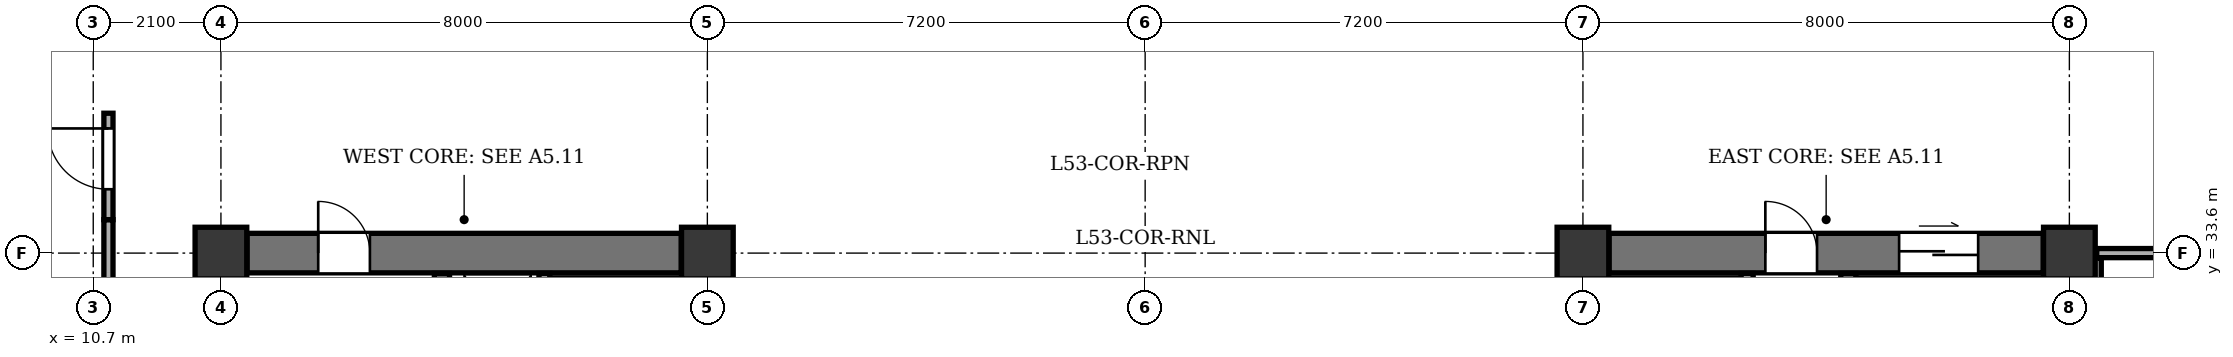
"""IFC4 building model, lengths in metres.
Left out: names, types, materials, properties, quantities, classifications, styles, units other than length and angle.
Written with IfcOpenShell. Run it as: python <this file> out.ifc"""

import sys

from ifc_helpers import new_model, si_unit, direction, frame, frame_2d, origin, origin_2d, place, context, subcontext, project, spatial, rectangle, extrude, element, fill, save


model = new_model("IFC4")
c1 = context("Model", 3, precision=1e-05, world=origin(), true_north=direction((0.0, 1.0)))
c2 = subcontext(c1, "Body", "Model", "MODEL_VIEW")
j1 = project(units=[si_unit("LENGTHUNIT", "METRE"), si_unit("PLANEANGLEUNIT", "RADIAN")], contexts=[c1])
p1 = place(None, origin())
s1 = spatial("IfcSite", under=j1, at=p1, CompositionType="ELEMENT")
p2 = place(p1, origin())
s2 = spatial("IfcBuilding", under=s1, at=p2, CompositionType="ELEMENT")
p3 = place(p2, frame((0.0, 0.0, 207.5)))
s3 = spatial("IfcBuildingStorey", under=s2, at=p3, CompositionType="ELEMENT", Elevation=207.5)
for number, where, z_axis, x_axis in (
    (1, (12.8, 33.6, 0.0), (0.0, 0.0, 1.0), (1.0, 0.0, 0.0)),
    (2, (20.8, 33.6, 0.0), (0.0, 0.0, 1.0), (1.0, 0.0, 0.0)),
    (3, (35.2, 33.6, 0.0), (0.0, 0.0, 1.0), (1.0, 0.0, 0.0)),
    (4, (43.2, 33.6, 0.0), (0.0, 0.0, 1.0), (1.0, 0.0, 0.0)),
):
    element("IfcColumn", number, at=place(p3, frame(where, z_axis=z_axis, x_axis=x_axis)), inside=s3, PredefinedType="COLUMN", context=c2, shape_type="SweptSolid", body=[
        extrude(rectangle(XDim=0.85, YDim=0.85, at=origin_2d()), origin(), (0.0, 0.0, 1.0), 3.4),
    ])
p4 = place(p3, frame((13.23, 33.6, 0.0), z_axis=(0.0, 0.0, 1.0), x_axis=(1.0, 0.0, 0.0)))
e5 = element("IfcWall", 5, at=p4, inside=s3, PredefinedType="SHEAR", context=c2, shape_type="SweptSolid", body=[
    extrude(rectangle(XDim=7.14, YDim=0.65, at=frame_2d((3.57, 0.0))), origin(), (0.0, 0.0, 1.0), 3.1),
])
p5 = place(p4, frame((1.17, 0.0, 0.0)))
e6 = element("IfcOpeningElement", 6, at=p5, cuts=e5, PredefinedType="OPENING", context=c2, shape_type="SweptSolid", body=[
    extrude(rectangle(XDim=0.85, YDim=2.02, at=frame_2d((0.425, 1.01))), frame((0.0, 0.335, 0.0), z_axis=(0.0, -1.0, 0.0), x_axis=(1.0, 0.0, 0.0)), (0.0, 0.0, 1.0), 0.67),
])
p6 = place(p3, frame((16.435, 21.135, 0.0), z_axis=(0.0, 0.0, 1.0), x_axis=(0.0, 1.0, 0.0)))
e7 = element("IfcWall", 7, at=p6, inside=s3, PredefinedType="SHEAR", context=c2, shape_type="SweptSolid", body=[
    extrude(rectangle(XDim=12.13, YDim=0.25, at=frame_2d((6.065, 0.0))), origin(), (0.0, 0.0, 1.0), 3.1),
])
p7 = place(p6, frame((0.515, 0.0, 0.0)))
e8 = element("IfcOpeningElement", 8, at=p7, cuts=e7, PredefinedType="OPENING", context=c2, shape_type="SweptSolid", body=[
    extrude(rectangle(XDim=1.2, YDim=2.15, at=frame_2d((0.6, 1.075))), frame((0.0, 0.135, 0.0), z_axis=(0.0, -1.0, 0.0), x_axis=(1.0, 0.0, 0.0)), (0.0, 0.0, 1.0), 0.27),
])
p8 = place(p6, frame((2.665, 0.0, 0.0)))
e9 = element("IfcOpeningElement", 9, at=p8, cuts=e7, PredefinedType="OPENING", context=c2, shape_type="SweptSolid", body=[
    extrude(rectangle(XDim=1.15, YDim=2.15, at=frame_2d((0.575, 1.075))), frame((0.0, 0.135, 0.0), z_axis=(0.0, -1.0, 0.0), x_axis=(1.0, 0.0, 0.0)), (0.0, 0.0, 1.0), 0.27),
])
p9 = place(p3, frame((18.12, 31.17, 0.0), z_axis=(0.0, 0.0, 1.0), x_axis=(0.0, 1.0, 0.0)))
e10 = element("IfcWall", 10, at=p9, inside=s3, PredefinedType="PARTITIONING", context=c2, shape_type="SweptSolid", body=[
    extrude(rectangle(XDim=2.095, YDim=0.18, at=frame_2d((1.047, 0.0))), origin(), (0.0, 0.0, 1.0), 3.1),
])
p10 = place(p3, frame((35.63, 33.6, 0.0), z_axis=(0.0, 0.0, 1.0), x_axis=(1.0, 0.0, 0.0)))
e11 = element("IfcWall", 11, at=p10, inside=s3, PredefinedType="SHEAR", context=c2, shape_type="SweptSolid", body=[
    extrude(rectangle(XDim=7.14, YDim=0.65, at=frame_2d((3.57, 0.0))), origin(), (0.0, 0.0, 1.0), 3.1),
])
p11 = place(p10, frame((4.77, 0.0, 0.0)))
e12 = element("IfcOpeningElement", 12, at=p11, cuts=e11, PredefinedType="OPENING", context=c2, shape_type="SweptSolid", body=[
    extrude(rectangle(XDim=1.3, YDim=2.15, at=frame_2d((0.65, 1.075))), frame((0.0, 0.335, 0.0), z_axis=(0.0, -1.0, 0.0), x_axis=(1.0, 0.0, 0.0)), (0.0, 0.0, 1.0), 0.67),
])
p12 = place(p10, frame((2.57, 0.0, 0.0)))
e13 = element("IfcOpeningElement", 13, at=p12, cuts=e11, PredefinedType="OPENING", context=c2, shape_type="SweptSolid", body=[
    extrude(rectangle(XDim=0.85, YDim=2.02, at=frame_2d((0.425, 1.01))), frame((0.0, 0.335, 0.0), z_axis=(0.0, -1.0, 0.0), x_axis=(1.0, 0.0, 0.0)), (0.0, 0.0, 1.0), 0.67),
])
p13 = place(p3, frame((39.565, 21.135, 0.0), z_axis=(0.0, 0.0, 1.0), x_axis=(0.0, 1.0, 0.0)))
e14 = element("IfcWall", 14, at=p13, inside=s3, PredefinedType="SHEAR", context=c2, shape_type="SweptSolid", body=[
    extrude(rectangle(XDim=12.13, YDim=0.25, at=frame_2d((6.065, 0.0))), origin(), (0.0, 0.0, 1.0), 3.1),
])
p14 = place(p13, frame((0.515, 0.0, 0.0)))
e15 = element("IfcOpeningElement", 15, at=p14, cuts=e14, PredefinedType="OPENING", context=c2, shape_type="SweptSolid", body=[
    extrude(rectangle(XDim=1.2, YDim=2.15, at=frame_2d((0.6, 1.075))), frame((0.0, 0.135, 0.0), z_axis=(0.0, -1.0, 0.0), x_axis=(1.0, 0.0, 0.0)), (0.0, 0.0, 1.0), 0.27),
])
p15 = place(p13, frame((2.665, 0.0, 0.0)))
e16 = element("IfcOpeningElement", 16, at=p15, cuts=e14, PredefinedType="OPENING", context=c2, shape_type="SweptSolid", body=[
    extrude(rectangle(XDim=1.15, YDim=2.15, at=frame_2d((0.575, 1.075))), frame((0.0, 0.135, 0.0), z_axis=(0.0, -1.0, 0.0), x_axis=(1.0, 0.0, 0.0)), (0.0, 0.0, 1.0), 0.27),
])
p16 = place(p3, frame((37.9, 25.27, 0.0), z_axis=(0.0, 0.0, 1.0), x_axis=(0.0, 1.0, 0.0)))
e17 = element("IfcWall", 17, at=p16, inside=s3, PredefinedType="SOLIDWALL", context=c2, shape_type="SweptSolid", body=[
    extrude(rectangle(XDim=7.995, YDim=0.2, at=frame_2d((3.998, 0.0))), origin(), (0.0, 0.0, 1.0), 3.1),
])
p17 = place(p3, frame((10.95, 20.25, 0.0), z_axis=(0.0, 0.0, 1.0), x_axis=(0.0, 1.0, 0.0)))
e18 = element("IfcWall", 18, at=p17, inside=s3, PredefinedType="PARTITIONING", context=c2, shape_type="SweptSolid", body=[
    extrude(rectangle(XDim=13.9, YDim=0.15, at=frame_2d((6.95, 0.0))), origin(), (0.0, 0.0, 1.0), 3.1),
])
p18 = place(p3, frame((10.95, 34.15, 0.0), z_axis=(0.0, 0.0, 1.0), x_axis=(0.0, 1.0, 0.0)))
e19 = element("IfcWall", 19, at=p18, inside=s3, PredefinedType="PARTITIONING", context=c2, shape_type="SweptSolid", body=[
    extrude(rectangle(XDim=1.75, YDim=0.15, at=frame_2d((0.875, 0.0))), origin(), (0.0, 0.0, 1.0), 3.1),
])
p19 = place(p18, frame((0.5, 0.0, 0.0)))
e20 = element("IfcOpeningElement", 20, at=p19, cuts=e19, PredefinedType="OPENING", context=c2, shape_type="SweptSolid", body=[
    extrude(rectangle(XDim=1.0, YDim=2.1, at=frame_2d((0.5, 1.05))), frame((0.0, 0.085, 0.0), z_axis=(0.0, -1.0, 0.0), x_axis=(1.0, 0.0, 0.0)), (0.0, 0.0, 1.0), 0.17),
])
p20 = place(p3, frame((43.65, 33.6, 0.0), z_axis=(0.0, 0.0, 1.0), x_axis=(1.0, 0.0, 0.0)))
e21 = element("IfcWall", 21, at=p20, inside=s3, PredefinedType="PARTITIONING", context=c2, shape_type="SweptSolid", body=[
    extrude(rectangle(XDim=5.305, YDim=0.15, at=frame_2d((2.653, 0.0))), origin(), (0.0, 0.0, 1.0), 2.535),
])
p21 = place(p3, frame((43.65, 20.25, 0.0), z_axis=(0.0, 0.0, 1.0), x_axis=(0.0, 1.0, 0.0)))
e22 = element("IfcWall", 22, at=p21, inside=s3, PredefinedType="PARTITIONING", context=c2, shape_type="SweptSolid", body=[
    extrude(rectangle(XDim=13.27, YDim=0.15, at=frame_2d((6.635, 0.0))), origin(), (0.0, 0.0, 1.0), 3.1),
])
p22 = place(p5, origin())
e23 = element("IfcDoor", 23, at=p22, inside=s3, OperationType="SINGLE_SWING_LEFT", PredefinedType="DOOR", context=c2, shape_type="SweptSolid", body=[
    extrude(rectangle(XDim=0.85, YDim=2.02, at=frame_2d((0.425, 1.01))), frame((0.0, 0.025, 0.0), z_axis=(0.0, -1.0, 0.0), x_axis=(1.0, 0.0, 0.0)), (0.0, 0.0, 1.0), 0.05),
])
fill(e6, e23)
p23 = place(p11, origin())
e24 = element("IfcDoor", 24, at=p23, inside=s3, OperationType="DOUBLE_DOOR_SLIDING", PredefinedType="DOOR", context=c2, shape_type="SweptSolid", body=[
    extrude(rectangle(XDim=1.3, YDim=2.15, at=frame_2d((0.65, 1.075))), frame((0.0, 0.025, 0.0), z_axis=(0.0, -1.0, 0.0), x_axis=(1.0, 0.0, 0.0)), (0.0, 0.0, 1.0), 0.05),
])
fill(e12, e24)
p24 = place(p12, origin())
e25 = element("IfcDoor", 25, at=p24, inside=s3, OperationType="SINGLE_SWING_LEFT", PredefinedType="DOOR", context=c2, shape_type="SweptSolid", body=[
    extrude(rectangle(XDim=0.85, YDim=2.02, at=frame_2d((0.425, 1.01))), frame((0.0, 0.025, 0.0), z_axis=(0.0, -1.0, 0.0), x_axis=(1.0, 0.0, 0.0)), (0.0, 0.0, 1.0), 0.05),
])
fill(e13, e25)
p25 = place(p19, origin())
e26 = element("IfcDoor", 26, at=p25, inside=s3, OperationType="SINGLE_SWING_RIGHT", PredefinedType="DOOR", context=c2, shape_type="SweptSolid", body=[
    extrude(rectangle(XDim=1.0, YDim=2.1, at=frame_2d((0.5, 1.05))), frame((0.0, 0.025, 0.0), z_axis=(0.0, -1.0, 0.0), x_axis=(1.0, 0.0, 0.0)), (0.0, 0.0, 1.0), 0.05),
])
fill(e20, e26)
save(model, sys.argv[1])
